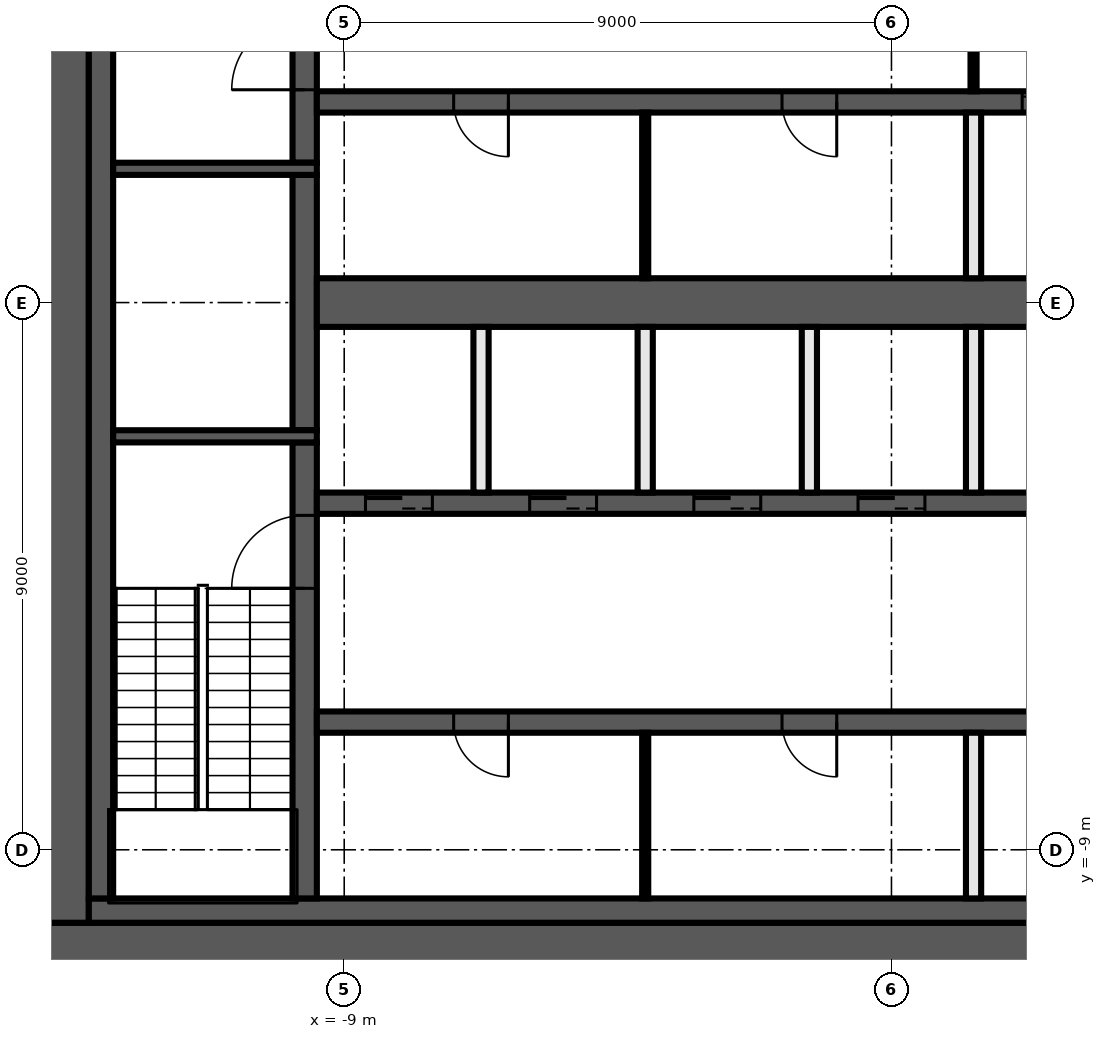
"""IFC4 building model, lengths in metres.
Left out: names, types, materials, properties, quantities, classifications, styles, units other than length and angle.
Written with IfcOpenShell. Run it as: python <this file> out.ifc"""

import sys

from ifc_helpers import new_model, si_unit, direction, frame, frame_2d, origin, place, context, subcontext, project, spatial, rectangle, extrude, element, fill, save


model = new_model("IFC4")
c1 = context("Model", 3, precision=1e-05, world=origin(), true_north=direction((0.0, 1.0)))
c2 = subcontext(c1, "Body", "Model", "MODEL_VIEW")
j1 = project(units=[si_unit("LENGTHUNIT", "METRE"), si_unit("PLANEANGLEUNIT", "RADIAN")], contexts=[c1])
p1 = place(None, origin())
s1 = spatial("IfcSite", under=j1, at=p1, CompositionType="ELEMENT")
p2 = place(p1, origin())
s2 = spatial("IfcBuilding", under=s1, at=p2, CompositionType="ELEMENT")
p3 = place(p2, frame((0.0, 0.0, 215.6)))
s3 = spatial("IfcBuildingStorey", under=s2, at=p3, CompositionType="ELEMENT", Elevation=215.6)
p4 = place(p3, frame((14.0, -10.6, 0.0), z_axis=(0.0, 0.0, 1.0), x_axis=(-1.0, 0.0, 0.0)))
e1 = element("IfcWall", 1, at=p4, inside=s3, PredefinedType="SHEAR", context=c2, shape_type="SweptSolid", body=[
    extrude(rectangle(XDim=28.0, YDim=0.8, at=frame_2d((14.0, 0.0))), origin(), (0.0, 0.0, 1.0), 4.4),
])
p5 = place(p4, frame((5.1, 0.0, 0.0)))
e2 = element("IfcOpeningElement", 2, at=p5, cuts=e1, PredefinedType="OPENING", context=c2, shape_type="SweptSolid", body=[
    extrude(rectangle(XDim=1.6, YDim=2.1, at=frame_2d((0.8, 1.05))), frame((0.0, 0.41, 0.0), z_axis=(0.0, -1.0, 0.0), x_axis=(1.0, 0.0, 0.0)), (0.0, 0.0, 1.0), 0.82),
])
p6 = place(p3, frame((-13.6, -10.2, 0.0), z_axis=(0.0, 0.0, 1.0), x_axis=(0.0, 1.0, 0.0)))
e3 = element("IfcWall", 3, at=p6, inside=s3, PredefinedType="SHEAR", context=c2, shape_type="SweptSolid", body=[
    extrude(rectangle(XDim=20.4, YDim=0.8, at=frame_2d((10.2, 0.0))), origin(), (0.0, 0.0, 1.0), 4.4),
])
p7 = place(p3, frame((6.9, -10.0, 0.0), z_axis=(0.0, 0.0, 1.0), x_axis=(-1.0, 0.0, 0.0)))
e4 = element("IfcWall", 4, at=p7, inside=s3, PredefinedType="SHEAR", context=c2, shape_type="SweptSolid", body=[
    extrude(rectangle(XDim=20.1, YDim=0.4, at=frame_2d((10.05, 0.0))), origin(), (0.0, 0.0, 1.0), 4.4),
])
p8 = place(p3, frame((-13.0, -9.8, 0.0), z_axis=(0.0, 0.0, 1.0), x_axis=(0.0, 1.0, 0.0)))
e5 = element("IfcWall", 5, at=p8, inside=s3, PredefinedType="SHEAR", context=c2, shape_type="SweptSolid", body=[
    extrude(rectangle(XDim=19.6, YDim=0.4, at=frame_2d((9.8, 0.0))), origin(), (0.0, 0.0, 1.0), 4.4),
])
p9 = place(p3, frame((-9.65, -9.8, 0.0), z_axis=(0.0, 0.0, 1.0), x_axis=(0.0, 1.0, 0.0)))
e6 = element("IfcWall", 6, at=p9, inside=s3, PredefinedType="SHEAR", context=c2, shape_type="SweptSolid", body=[
    extrude(rectangle(XDim=7.5, YDim=0.4, at=frame_2d((3.75, 0.0))), origin(), (0.0, 0.0, 1.0), 4.4),
])
p10 = place(p9, frame((5.1, 0.0, 0.0)))
e7 = element("IfcOpeningElement", 7, at=p10, cuts=e6, PredefinedType="OPENING", context=c2, shape_type="SweptSolid", body=[
    extrude(rectangle(XDim=1.2, YDim=2.1, at=frame_2d((0.6, 1.05))), frame((0.0, 0.21, 0.0), z_axis=(0.0, -1.0, 0.0), x_axis=(1.0, 0.0, 0.0)), (0.0, 0.0, 1.0), 0.42),
])
p11 = place(p3, frame((-9.65, -2.1, 0.0), z_axis=(0.0, 0.0, 1.0), x_axis=(0.0, 1.0, 0.0)))
e8 = element("IfcWall", 8, at=p11, inside=s3, PredefinedType="SHEAR", context=c2, shape_type="SweptSolid", body=[
    extrude(rectangle(XDim=4.2, YDim=0.4, at=frame_2d((2.1, 0.0))), origin(), (0.0, 0.0, 1.0), 4.4),
])
p12 = place(p3, frame((-9.65, 2.3, 0.0), z_axis=(0.0, 0.0, 1.0), x_axis=(0.0, 1.0, 0.0)))
e9 = element("IfcWall", 9, at=p12, inside=s3, PredefinedType="SHEAR", context=c2, shape_type="SweptSolid", body=[
    extrude(rectangle(XDim=7.5, YDim=0.4, at=frame_2d((3.75, 0.0))), origin(), (0.0, 0.0, 1.0), 4.4),
])
p13 = place(p12, frame((1.2, 0.0, 0.0)))
e10 = element("IfcOpeningElement", 10, at=p13, cuts=e9, PredefinedType="OPENING", context=c2, shape_type="SweptSolid", body=[
    extrude(rectangle(XDim=1.2, YDim=2.1, at=frame_2d((0.6, 1.05))), frame((0.0, 0.21, 0.0), z_axis=(0.0, -1.0, 0.0), x_axis=(1.0, 0.0, 0.0)), (0.0, 0.0, 1.0), 0.42),
])
for number, where, z_axis, x_axis in (
    (11, (-9.45, 2.2, 0.0), (0.0, 0.0, 1.0), (-1.0, 0.0, 0.0)),
    (12, (-9.45, -2.2, 0.0), (0.0, 0.0, 1.0), (-1.0, 0.0, 0.0)),
):
    element("IfcWall", number, at=place(p3, frame(where, z_axis=z_axis, x_axis=x_axis)), inside=s3, PredefinedType="SHEAR", context=c2, shape_type="SweptSolid", body=[
        extrude(rectangle(XDim=3.35, YDim=0.2, at=frame_2d((1.675, 0.0))), origin(), (0.0, 0.0, 1.0), 4.4),
    ])
p14 = place(p3, frame((9.45, 3.3, 0.0), z_axis=(0.0, 0.0, 1.0), x_axis=(-1.0, 0.0, 0.0)))
e13 = element("IfcWall", 13, at=p14, inside=s3, PredefinedType="SHEAR", context=c2, shape_type="SweptSolid", body=[
    extrude(rectangle(XDim=18.9, YDim=0.35, at=frame_2d((9.45, 0.0))), origin(), (0.0, 0.0, 1.0), 4.4),
])
p15 = place(p14, frame((6.2, 0.0, 0.0)))
e14 = element("IfcOpeningElement", 14, at=p15, cuts=e13, PredefinedType="OPENING", context=c2, shape_type="SweptSolid", body=[
    extrude(rectangle(XDim=1.1, YDim=2.1, at=frame_2d((0.55, 1.05))), frame((0.0, 0.185, 0.0), z_axis=(0.0, -1.0, 0.0), x_axis=(1.0, 0.0, 0.0)), (0.0, 0.0, 1.0), 0.37),
])
p16 = place(p14, frame((3.5, 0.0, 0.0)))
e15 = element("IfcOpeningElement", 15, at=p16, cuts=e13, PredefinedType="OPENING", context=c2, shape_type="SweptSolid", body=[
    extrude(rectangle(XDim=1.1, YDim=2.1, at=frame_2d((0.55, 1.05))), frame((0.0, 0.185, 0.0), z_axis=(0.0, -1.0, 0.0), x_axis=(1.0, 0.0, 0.0)), (0.0, 0.0, 1.0), 0.37),
])
p17 = place(p14, frame((0.9, 0.0, 0.0)))
e16 = element("IfcOpeningElement", 16, at=p17, cuts=e13, PredefinedType="OPENING", context=c2, shape_type="SweptSolid", body=[
    extrude(rectangle(XDim=0.9, YDim=2.1, at=frame_2d((0.45, 1.05))), frame((0.0, 0.185, 0.0), z_axis=(0.0, -1.0, 0.0), x_axis=(1.0, 0.0, 0.0)), (0.0, 0.0, 1.0), 0.37),
])
p18 = place(p14, frame((15.75, 0.0, 0.0)))
e17 = element("IfcOpeningElement", 17, at=p18, cuts=e13, PredefinedType="OPENING", context=c2, shape_type="SweptSolid", body=[
    extrude(rectangle(XDim=0.9, YDim=2.1, at=frame_2d((0.45, 1.05))), frame((0.0, 0.185, 0.0), z_axis=(0.0, -1.0, 0.0), x_axis=(1.0, 0.0, 0.0)), (0.0, 0.0, 1.0), 0.37),
])
p19 = place(p14, frame((10.35, 0.0, 0.0)))
e18 = element("IfcOpeningElement", 18, at=p19, cuts=e13, PredefinedType="OPENING", context=c2, shape_type="SweptSolid", body=[
    extrude(rectangle(XDim=0.9, YDim=2.1, at=frame_2d((0.45, 1.05))), frame((0.0, 0.185, 0.0), z_axis=(0.0, -1.0, 0.0), x_axis=(1.0, 0.0, 0.0)), (0.0, 0.0, 1.0), 0.37),
])
p20 = place(p3, frame((-9.45, -3.3, 0.0), z_axis=(0.0, 0.0, 1.0), x_axis=(1.0, 0.0, 0.0)))
e19 = element("IfcWall", 19, at=p20, inside=s3, PredefinedType="SHEAR", context=c2, shape_type="SweptSolid", body=[
    extrude(rectangle(XDim=18.9, YDim=0.35, at=frame_2d((9.45, 0.0))), origin(), (0.0, 0.0, 1.0), 4.4),
])
p21 = place(p20, frame((0.8, 0.0, 0.0)))
e20 = element("IfcOpeningElement", 20, at=p21, cuts=e19, PredefinedType="OPENING", context=c2, shape_type="SweptSolid", body=[
    extrude(rectangle(XDim=1.1, YDim=2.1, at=frame_2d((0.55, 1.05))), frame((0.0, 0.185, 0.0), z_axis=(0.0, -1.0, 0.0), x_axis=(1.0, 0.0, 0.0)), (0.0, 0.0, 1.0), 0.37),
])
p22 = place(p20, frame((3.5, 0.0, 0.0)))
e21 = element("IfcOpeningElement", 21, at=p22, cuts=e19, PredefinedType="OPENING", context=c2, shape_type="SweptSolid", body=[
    extrude(rectangle(XDim=1.1, YDim=2.1, at=frame_2d((0.55, 1.05))), frame((0.0, 0.185, 0.0), z_axis=(0.0, -1.0, 0.0), x_axis=(1.0, 0.0, 0.0)), (0.0, 0.0, 1.0), 0.37),
])
p23 = place(p20, frame((6.2, 0.0, 0.0)))
e22 = element("IfcOpeningElement", 22, at=p23, cuts=e19, PredefinedType="OPENING", context=c2, shape_type="SweptSolid", body=[
    extrude(rectangle(XDim=1.1, YDim=2.1, at=frame_2d((0.55, 1.05))), frame((0.0, 0.185, 0.0), z_axis=(0.0, -1.0, 0.0), x_axis=(1.0, 0.0, 0.0)), (0.0, 0.0, 1.0), 0.37),
])
p24 = place(p20, frame((8.9, 0.0, 0.0)))
e23 = element("IfcOpeningElement", 23, at=p24, cuts=e19, PredefinedType="OPENING", context=c2, shape_type="SweptSolid", body=[
    extrude(rectangle(XDim=1.1, YDim=2.1, at=frame_2d((0.55, 1.05))), frame((0.0, 0.185, 0.0), z_axis=(0.0, -1.0, 0.0), x_axis=(1.0, 0.0, 0.0)), (0.0, 0.0, 1.0), 0.37),
])
p25 = place(p20, frame((17.0, 0.0, 0.0)))
e24 = element("IfcOpeningElement", 24, at=p25, cuts=e19, PredefinedType="OPENING", context=c2, shape_type="SweptSolid", body=[
    extrude(rectangle(XDim=1.1, YDim=2.1, at=frame_2d((0.55, 1.05))), frame((0.0, 0.185, 0.0), z_axis=(0.0, -1.0, 0.0), x_axis=(1.0, 0.0, 0.0)), (0.0, 0.0, 1.0), 0.37),
])
p26 = place(p20, frame((13.05, 0.0, 0.0)))
e25 = element("IfcOpeningElement", 25, at=p26, cuts=e19, PredefinedType="OPENING", context=c2, shape_type="SweptSolid", body=[
    extrude(rectangle(XDim=0.9, YDim=2.1, at=frame_2d((0.45, 1.05))), frame((0.0, 0.185, 0.0), z_axis=(0.0, -1.0, 0.0), x_axis=(1.0, 0.0, 0.0)), (0.0, 0.0, 1.0), 0.37),
])
p27 = place(p3, frame((9.45, -6.9, 0.0), z_axis=(0.0, 0.0, 1.0), x_axis=(-1.0, 0.0, 0.0)))
e26 = element("IfcWall", 26, at=p27, inside=s3, PredefinedType="SHEAR", context=c2, shape_type="SweptSolid", body=[
    extrude(rectangle(XDim=18.9, YDim=0.35, at=frame_2d((9.45, 0.0))), origin(), (0.0, 0.0, 1.0), 4.4),
])
p28 = place(p27, frame((0.75, 0.0, 0.0)))
e27 = element("IfcOpeningElement", 27, at=p28, cuts=e26, PredefinedType="OPENING", context=c2, shape_type="SweptSolid", body=[
    extrude(rectangle(XDim=1.2, YDim=2.1, at=frame_2d((0.6, 1.05))), frame((0.0, 0.185, 0.0), z_axis=(0.0, -1.0, 0.0), x_axis=(1.0, 0.0, 0.0)), (0.0, 0.0, 1.0), 0.37),
])
p29 = place(p27, frame((15.75, 0.0, 0.0)))
e28 = element("IfcOpeningElement", 28, at=p29, cuts=e26, PredefinedType="OPENING", context=c2, shape_type="SweptSolid", body=[
    extrude(rectangle(XDim=0.9, YDim=2.1, at=frame_2d((0.45, 1.05))), frame((0.0, 0.185, 0.0), z_axis=(0.0, -1.0, 0.0), x_axis=(1.0, 0.0, 0.0)), (0.0, 0.0, 1.0), 0.37),
])
p30 = place(p27, frame((10.35, 0.0, 0.0)))
e29 = element("IfcOpeningElement", 29, at=p30, cuts=e26, PredefinedType="OPENING", context=c2, shape_type="SweptSolid", body=[
    extrude(rectangle(XDim=0.9, YDim=2.1, at=frame_2d((0.45, 1.05))), frame((0.0, 0.185, 0.0), z_axis=(0.0, -1.0, 0.0), x_axis=(1.0, 0.0, 0.0)), (0.0, 0.0, 1.0), 0.37),
])
p31 = place(p3, frame((-9.45, 0.0, 0.0), z_axis=(0.0, 0.0, 1.0), x_axis=(1.0, 0.0, 0.0)))
e30 = element("IfcWall", 30, at=p31, inside=s3, PredefinedType="SHEAR", context=c2, shape_type="SweptSolid", body=[
    extrude(rectangle(XDim=18.9, YDim=0.8, at=frame_2d((9.45, 0.0))), origin(), (0.0, 0.0, 1.0), 4.4),
])
p32 = place(p3, frame((1.35, 6.725, 0.0), z_axis=(0.0, 0.0, 1.0), x_axis=(0.0, -1.0, 0.0)))
e31 = element("IfcWall", 31, at=p32, inside=s3, PredefinedType="PARTITIONING", context=c2, shape_type="SweptSolid", body=[
    extrude(rectangle(XDim=3.25, YDim=0.1, at=frame_2d((1.625, 0.0))), origin(), (0.0, 0.0, 1.0), 4.4),
])
p33 = place(p32, frame((1.025, 0.0, 0.0)))
e32 = element("IfcOpeningElement", 32, at=p33, cuts=e31, PredefinedType="OPENING", context=c2, shape_type="SweptSolid", body=[
    extrude(rectangle(XDim=1.2, YDim=2.1, at=frame_2d((0.6, 1.05))), frame((0.0, 0.06, 0.0), z_axis=(0.0, -1.0, 0.0), x_axis=(1.0, 0.0, 0.0)), (0.0, 0.0, 1.0), 0.12),
])
for number, where, z_axis, x_axis in (
    (33, (1.35, -9.8, 0.0), (0.0, 0.0, 1.0), (0.0, 1.0, 0.0)),
    (34, (1.35, -3.125, 0.0), (0.0, 0.0, 1.0), (0.0, 1.0, 0.0)),
    (35, (1.35, 0.4, 0.0), (0.0, 0.0, 1.0), (0.0, 1.0, 0.0)),
    (36, (-1.35, -3.125, 0.0), (0.0, 0.0, 1.0), (0.0, 1.0, 0.0)),
):
    element("IfcWall", number, at=place(p3, frame(where, z_axis=z_axis, x_axis=x_axis)), inside=s3, PredefinedType="SOLIDWALL", context=c2, shape_type="SweptSolid", body=[
        extrude(rectangle(XDim=2.725, YDim=0.25, at=frame_2d((1.363, 0.0))), origin(), (0.0, 0.0, 1.0), 4.4),
    ])
for number, where, z_axis, x_axis in (
    (37, (-4.05, -9.8, 0.0), (0.0, 0.0, 1.0), (0.0, 1.0, 0.0)),
    (38, (-4.05, 0.4, 0.0), (0.0, 0.0, 1.0), (0.0, 1.0, 0.0)),
):
    element("IfcWall", number, at=place(p3, frame(where, z_axis=z_axis, x_axis=x_axis)), inside=s3, PredefinedType="PARTITIONING", context=c2, shape_type="SweptSolid", body=[
        extrude(rectangle(XDim=2.725, YDim=0.1, at=frame_2d((1.363, 0.0))), origin(), (0.0, 0.0, 1.0), 4.4),
    ])
for number, where, z_axis, x_axis in (
    (39, (-4.05, -3.125, 0.0), (0.0, 0.0, 1.0), (0.0, 1.0, 0.0)),
    (40, (-6.75, -3.125, 0.0), (0.0, 0.0, 1.0), (0.0, 1.0, 0.0)),
):
    element("IfcWall", number, at=place(p3, frame(where, z_axis=z_axis, x_axis=x_axis)), inside=s3, PredefinedType="SOLIDWALL", context=c2, shape_type="SweptSolid", body=[
        extrude(rectangle(XDim=2.725, YDim=0.25, at=frame_2d((1.363, 0.0))), origin(), (0.0, 0.0, 1.0), 4.4),
    ])
p34 = place(p15, origin())
e41 = element("IfcDoor", 41, at=p34, inside=s3, OperationType="DOUBLE_DOOR_SLIDING", PredefinedType="DOOR", context=c2, shape_type="SweptSolid", body=[
    extrude(rectangle(XDim=1.1, YDim=2.1, at=frame_2d((0.55, 1.05))), frame((0.0, 0.025, 0.0), z_axis=(0.0, -1.0, 0.0), x_axis=(1.0, 0.0, 0.0)), (0.0, 0.0, 1.0), 0.05),
])
fill(e14, e41)
p35 = place(p21, origin())
e42 = element("IfcDoor", 42, at=p35, inside=s3, OperationType="DOUBLE_DOOR_SLIDING", PredefinedType="DOOR", context=c2, shape_type="SweptSolid", body=[
    extrude(rectangle(XDim=1.1, YDim=2.1, at=frame_2d((0.55, 1.05))), frame((0.0, 0.025, 0.0), z_axis=(0.0, -1.0, 0.0), x_axis=(1.0, 0.0, 0.0)), (0.0, 0.0, 1.0), 0.05),
])
fill(e20, e42)
p36 = place(p22, origin())
e43 = element("IfcDoor", 43, at=p36, inside=s3, OperationType="DOUBLE_DOOR_SLIDING", PredefinedType="DOOR", context=c2, shape_type="SweptSolid", body=[
    extrude(rectangle(XDim=1.1, YDim=2.1, at=frame_2d((0.55, 1.05))), frame((0.0, 0.025, 0.0), z_axis=(0.0, -1.0, 0.0), x_axis=(1.0, 0.0, 0.0)), (0.0, 0.0, 1.0), 0.05),
])
fill(e21, e43)
p37 = place(p23, origin())
e44 = element("IfcDoor", 44, at=p37, inside=s3, OperationType="DOUBLE_DOOR_SLIDING", PredefinedType="DOOR", context=c2, shape_type="SweptSolid", body=[
    extrude(rectangle(XDim=1.1, YDim=2.1, at=frame_2d((0.55, 1.05))), frame((0.0, 0.025, 0.0), z_axis=(0.0, -1.0, 0.0), x_axis=(1.0, 0.0, 0.0)), (0.0, 0.0, 1.0), 0.05),
])
fill(e22, e44)
p38 = place(p24, origin())
e45 = element("IfcDoor", 45, at=p38, inside=s3, OperationType="DOUBLE_DOOR_SLIDING", PredefinedType="DOOR", context=c2, shape_type="SweptSolid", body=[
    extrude(rectangle(XDim=1.1, YDim=2.1, at=frame_2d((0.55, 1.05))), frame((0.0, 0.025, 0.0), z_axis=(0.0, -1.0, 0.0), x_axis=(1.0, 0.0, 0.0)), (0.0, 0.0, 1.0), 0.05),
])
fill(e23, e45)
p39 = place(p18, origin())
e46 = element("IfcDoor", 46, at=p39, inside=s3, OperationType="SINGLE_SWING_RIGHT", PredefinedType="DOOR", context=c2, shape_type="SweptSolid", body=[
    extrude(rectangle(XDim=0.9, YDim=2.1, at=frame_2d((0.45, 1.05))), frame((0.0, 0.025, 0.0), z_axis=(0.0, -1.0, 0.0), x_axis=(1.0, 0.0, 0.0)), (0.0, 0.0, 1.0), 0.05),
])
fill(e17, e46)
p40 = place(p19, origin())
e47 = element("IfcDoor", 47, at=p40, inside=s3, OperationType="SINGLE_SWING_LEFT", PredefinedType="DOOR", context=c2, shape_type="SweptSolid", body=[
    extrude(rectangle(XDim=0.9, YDim=2.1, at=frame_2d((0.45, 1.05))), frame((0.0, 0.025, 0.0), z_axis=(0.0, -1.0, 0.0), x_axis=(1.0, 0.0, 0.0)), (0.0, 0.0, 1.0), 0.05),
])
fill(e18, e47)
p41 = place(p29, origin())
e48 = element("IfcDoor", 48, at=p41, inside=s3, OperationType="SINGLE_SWING_LEFT", PredefinedType="DOOR", context=c2, shape_type="SweptSolid", body=[
    extrude(rectangle(XDim=0.9, YDim=2.1, at=frame_2d((0.45, 1.05))), frame((0.0, 0.025, 0.0), z_axis=(0.0, -1.0, 0.0), x_axis=(1.0, 0.0, 0.0)), (0.0, 0.0, 1.0), 0.05),
])
fill(e28, e48)
p42 = place(p30, origin())
e49 = element("IfcDoor", 49, at=p42, inside=s3, OperationType="SINGLE_SWING_RIGHT", PredefinedType="DOOR", context=c2, shape_type="SweptSolid", body=[
    extrude(rectangle(XDim=0.9, YDim=2.1, at=frame_2d((0.45, 1.05))), frame((0.0, 0.025, 0.0), z_axis=(0.0, -1.0, 0.0), x_axis=(1.0, 0.0, 0.0)), (0.0, 0.0, 1.0), 0.05),
])
fill(e29, e49)
p43 = place(p13, origin())
e50 = element("IfcDoor", 50, at=p43, inside=s3, OperationType="SINGLE_SWING_RIGHT", PredefinedType="DOOR", context=c2, shape_type="SweptSolid", body=[
    extrude(rectangle(XDim=1.2, YDim=2.1, at=frame_2d((0.6, 1.05))), frame((0.0, 0.025, 0.0), z_axis=(0.0, -1.0, 0.0), x_axis=(1.0, 0.0, 0.0)), (0.0, 0.0, 1.0), 0.05),
])
fill(e10, e50)
p44 = place(p10, origin())
e51 = element("IfcDoor", 51, at=p44, inside=s3, OperationType="SINGLE_SWING_LEFT", PredefinedType="DOOR", context=c2, shape_type="SweptSolid", body=[
    extrude(rectangle(XDim=1.2, YDim=2.1, at=frame_2d((0.6, 1.05))), frame((0.0, 0.025, 0.0), z_axis=(0.0, -1.0, 0.0), x_axis=(1.0, 0.0, 0.0)), (0.0, 0.0, 1.0), 0.05),
])
fill(e7, e51)
save(model, sys.argv[1])
